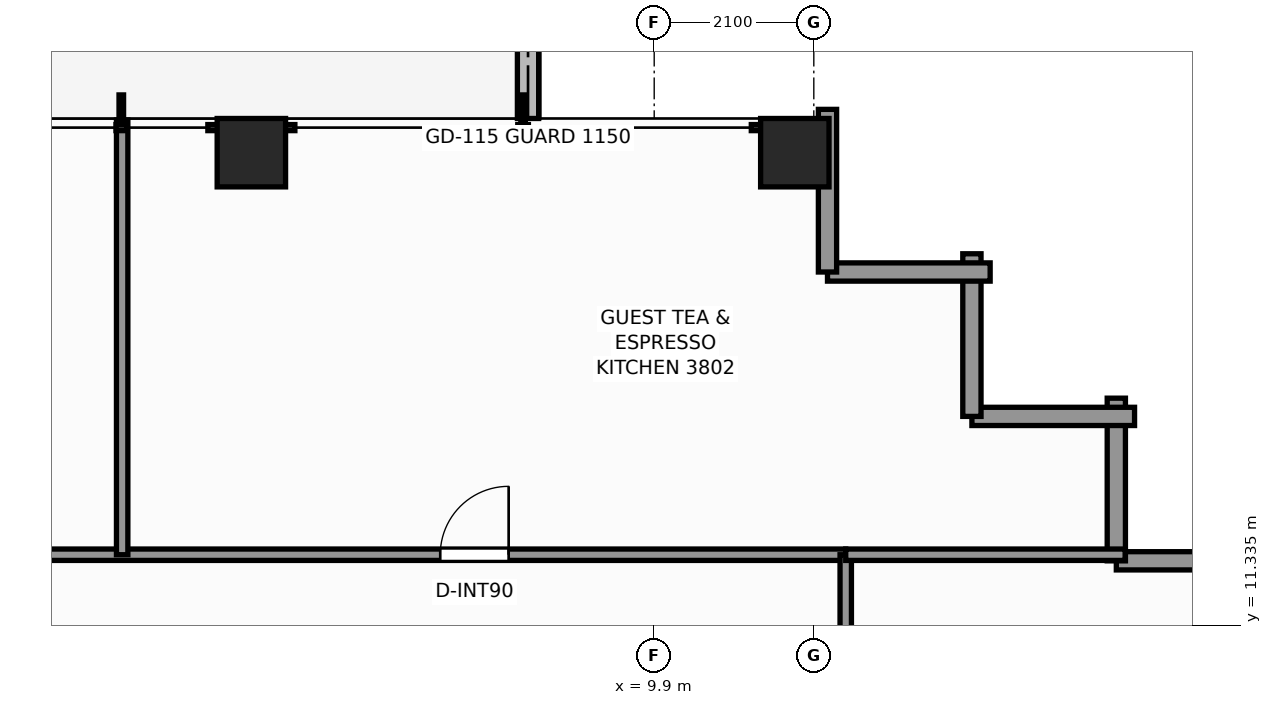
"""IFC4 building model, lengths in metres.
Left out: names, types, materials, properties, quantities, classifications, styles, units other than length and angle.
Written with IfcOpenShell. Run it as: python <this file> out.ifc"""

import sys

from ifc_helpers import new_model, si_unit, direction, frame, frame_2d, origin, origin_2d, place, context, subcontext, project, spatial, rectangle, extrude, element, fill, save


model = new_model("IFC4")
c1 = context("Model", 3, precision=1e-05, world=origin(), true_north=direction((0.0, 1.0)))
c2 = subcontext(c1, "Body", "Model", "MODEL_VIEW")
j1 = project(units=[si_unit("LENGTHUNIT", "METRE"), si_unit("PLANEANGLEUNIT", "RADIAN")], contexts=[c1])
p1 = place(None, origin())
s1 = spatial("IfcSite", under=j1, at=p1, CompositionType="ELEMENT")
p2 = place(p1, origin())
s2 = spatial("IfcBuilding", under=s1, at=p2, CompositionType="ELEMENT")
p3 = place(p2, frame((0.0, 0.0, 131.6)))
s3 = spatial("IfcBuildingStorey", under=s2, at=p3, CompositionType="ELEMENT", Elevation=131.6)
for number, where, z_axis, x_axis in (
    (1, (4.6, 17.55, 0.0), (0.0, 0.0, 1.0), (1.0, 0.0, 0.0)),
    (2, (11.75, 17.55, 0.0), (0.0, 0.0, 1.0), (1.0, 0.0, 0.0)),
):
    element("IfcColumn", number, at=place(p3, frame(where, z_axis=z_axis, x_axis=x_axis)), inside=s3, PredefinedType="COLUMN", context=c2, shape_type="SweptSolid", body=[
        extrude(rectangle(XDim=0.9, YDim=0.9, at=origin_2d()), origin(), (0.0, 0.0, 1.0), 3.3),
    ])
p4 = place(p3, frame((8.24, 18.0, -0.02), z_axis=(0.0, 0.0, 1.0), x_axis=(0.0, 1.0, 0.0)))
e3 = element("IfcWall", 3, at=p4, inside=s3, PredefinedType="PARAPET", context=c2, shape_type="SweptSolid", body=[
    extrude(rectangle(XDim=2.975, YDim=0.28, at=frame_2d((1.487, 0.0))), origin(), (0.0, 0.0, 1.0), 0.42),
])
for number, where, z_axis, x_axis in (
    (4, (15.98, 12.18, 0.0), (0.0, 0.0, 1.0), (1.0, 0.0, 0.0)),
    (5, (15.98, 14.32, 0.0), (0.0, 0.0, 1.0), (0.0, -1.0, 0.0)),
):
    element("IfcWall", number, at=place(p3, frame(where, z_axis=z_axis, x_axis=x_axis)), inside=s3, PredefinedType="STANDARD", context=c2, shape_type="SweptSolid", body=[
        extrude(rectangle(XDim=2.14, YDim=0.24, at=frame_2d((1.07, 0.0))), origin(), (0.0, 0.0, 1.0), 2.479),
    ])
for number, where, z_axis, x_axis in (
    (6, (14.08, 14.08, 0.0), (0.0, 0.0, 1.0), (1.0, 0.0, 0.0)),
    (7, (14.08, 16.22, 0.0), (0.0, 0.0, 1.0), (0.0, -1.0, 0.0)),
):
    element("IfcWall", number, at=place(p3, frame(where, z_axis=z_axis, x_axis=x_axis)), inside=s3, PredefinedType="STANDARD", context=c2, shape_type="SweptSolid", body=[
        extrude(rectangle(XDim=2.14, YDim=0.24, at=frame_2d((1.07, 0.0))), origin(), (0.0, 0.0, 1.0), 2.479),
    ])
for number, where, z_axis, x_axis in (
    (8, (12.18, 15.98, 0.0), (0.0, 0.0, 1.0), (1.0, 0.0, 0.0)),
    (9, (12.18, 18.12, 0.0), (0.0, 0.0, 1.0), (0.0, -1.0, 0.0)),
):
    element("IfcWall", number, at=place(p3, frame(where, z_axis=z_axis, x_axis=x_axis)), inside=s3, PredefinedType="STANDARD", context=c2, shape_type="SweptSolid", body=[
        extrude(rectangle(XDim=2.14, YDim=0.24, at=frame_2d((1.07, 0.0))), origin(), (0.0, 0.0, 1.0), 2.479),
    ])
p5 = place(p3, frame((-12.26, 12.26, 0.0), z_axis=(0.0, 0.0, 1.0), x_axis=(1.0, 0.0, 0.0)))
e10 = element("IfcWall", 10, at=p5, inside=s3, PredefinedType="PARTITIONING", context=c2, shape_type="SweptSolid", body=[
    extrude(rectangle(XDim=24.68, YDim=0.15, at=frame_2d((12.34, 0.0))), origin(), (0.0, 0.0, 1.0), 2.312),
])
p6 = place(p5, frame((4.275, 0.0, 0.0)))
e11 = element("IfcOpeningElement", 11, at=p6, cuts=e10, PredefinedType="OPENING", context=c2, shape_type="SweptSolid", body=[
    extrude(rectangle(XDim=0.9, YDim=2.06, at=frame_2d((0.45, 1.03))), frame((0.0, 0.085, 0.0), z_axis=(0.0, -1.0, 0.0), x_axis=(1.0, 0.0, 0.0)), (0.0, 0.0, 1.0), 0.17),
])
p7 = place(p5, frame((19.345, 0.0, 0.0)))
e12 = element("IfcOpeningElement", 12, at=p7, cuts=e10, PredefinedType="OPENING", context=c2, shape_type="SweptSolid", body=[
    extrude(rectangle(XDim=0.9, YDim=2.06, at=frame_2d((0.45, 1.03))), frame((0.0, 0.085, 0.0), z_axis=(0.0, -1.0, 0.0), x_axis=(1.0, 0.0, 0.0)), (0.0, 0.0, 1.0), 0.17),
])
p8 = place(p3, frame((12.42, -12.58, 0.0), z_axis=(0.0, 0.0, 1.0), x_axis=(0.0, 1.0, 0.0)))
e13 = element("IfcWall", 13, at=p8, inside=s3, PredefinedType="PARTITIONING", context=c2, shape_type="SweptSolid", body=[
    extrude(rectangle(XDim=24.84, YDim=0.15, at=frame_2d((12.42, 0.0))), origin(), (0.0, 0.0, 1.0), 2.312),
])
p9 = place(p8, frame((4.595, 0.0, 0.0)))
e14 = element("IfcOpeningElement", 14, at=p9, cuts=e13, PredefinedType="OPENING", context=c2, shape_type="SweptSolid", body=[
    extrude(rectangle(XDim=0.9, YDim=2.06, at=frame_2d((0.45, 1.03))), frame((0.0, 0.085, 0.0), z_axis=(0.0, -1.0, 0.0), x_axis=(1.0, 0.0, 0.0)), (0.0, 0.0, 1.0), 0.17),
])
p10 = place(p8, frame((19.665, 0.0, 0.0)))
e15 = element("IfcOpeningElement", 15, at=p10, cuts=e13, PredefinedType="OPENING", context=c2, shape_type="SweptSolid", body=[
    extrude(rectangle(XDim=0.9, YDim=2.06, at=frame_2d((0.45, 1.03))), frame((0.0, 0.085, 0.0), z_axis=(0.0, -1.0, 0.0), x_axis=(1.0, 0.0, 0.0)), (0.0, 0.0, 1.0), 0.17),
])
p11 = place(p3, frame((12.42, 12.26, 0.0), z_axis=(0.0, 0.0, 1.0), x_axis=(1.0, 0.0, 0.0)))
e16 = element("IfcWall", 16, at=p11, inside=s3, PredefinedType="PARTITIONING", context=c2, shape_type="SweptSolid", body=[
    extrude(rectangle(XDim=3.676, YDim=0.15, at=frame_2d((1.838, 0.0))), origin(), (0.0, 0.0, 1.0), 3.1),
])
p12 = place(p3, frame((2.9, 12.26, 0.0), z_axis=(0.0, 0.0, 1.0), x_axis=(0.0, 1.0, 0.0)))
e17 = element("IfcWall", 17, at=p12, inside=s3, PredefinedType="PARTITIONING", context=c2, shape_type="SweptSolid", body=[
    extrude(rectangle(XDim=5.72, YDim=0.15, at=frame_2d((2.86, 0.0))), origin(), (0.0, 0.0, 1.0), 2.389),
])
p13 = place(p7, origin())
e18 = element("IfcDoor", 18, at=p13, inside=s3, OperationType="SINGLE_SWING_RIGHT", PredefinedType="DOOR", context=c2, shape_type="SweptSolid", body=[
    extrude(rectangle(XDim=0.9, YDim=2.06, at=frame_2d((0.45, 1.03))), frame((0.0, 0.025, 0.0), z_axis=(0.0, -1.0, 0.0), x_axis=(1.0, 0.0, 0.0)), (0.0, 0.0, 1.0), 0.05),
])
fill(e12, e18)
save(model, sys.argv[1])
